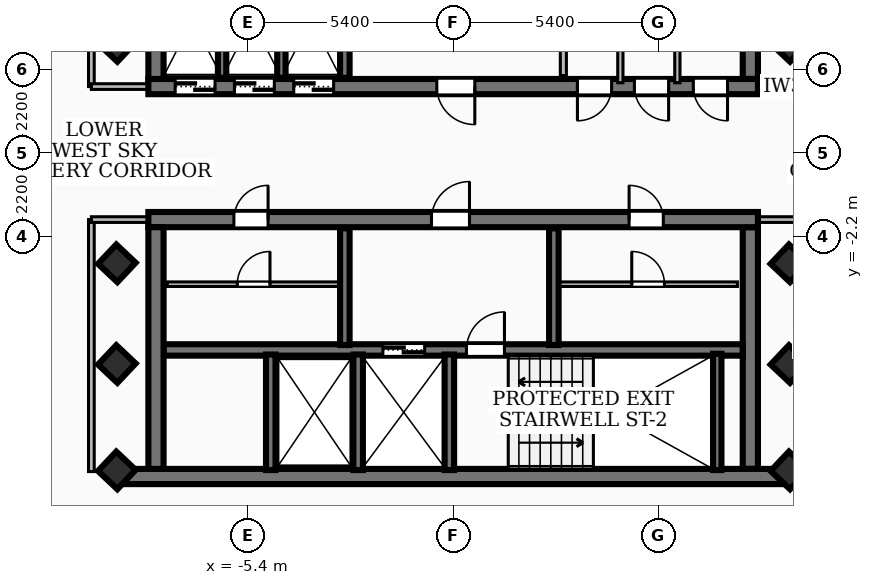
"""IFC4 building model, lengths in metres.
Left out: names, types, materials, properties, quantities, classifications, styles, units other than length and angle.
Written with IfcOpenShell. Run it as: python <this file> out.ifc"""

import sys

from ifc_helpers import new_model, si_unit, direction, frame, frame_2d, origin, origin_2d, place, context, subcontext, project, spatial, rectangle, extrude, element, fill, save


model = new_model("IFC4")
c1 = context("Model", 3, precision=1e-05, world=origin(), true_north=direction((0.0, 1.0)))
c2 = subcontext(c1, "Body", "Model", "MODEL_VIEW")
j1 = project(units=[si_unit("LENGTHUNIT", "METRE"), si_unit("PLANEANGLEUNIT", "RADIAN")], contexts=[c1])
p1 = place(None, origin())
s1 = spatial("IfcSite", under=j1, at=p1, CompositionType="ELEMENT")
p2 = place(p1, origin())
s2 = spatial("IfcBuilding", under=s1, at=p2, CompositionType="ELEMENT")
p3 = place(p2, frame((0.0, 0.0, 247.5)))
s3 = spatial("IfcBuildingStorey", under=s2, at=p3, CompositionType="ELEMENT", Elevation=247.5)
p4 = place(p3, frame((8.02, 1.75, 0.0), z_axis=(0.0, 0.0, 1.0), x_axis=(-1.0, 0.0, 0.0)))
e1 = element("IfcWall", 1, at=p4, inside=s3, PredefinedType="SHEAR", context=c2, shape_type="SweptSolid", body=[
    extrude(rectangle(XDim=16.04, YDim=0.4, at=frame_2d((8.02, 0.0))), origin(), (0.0, 0.0, 1.0), 3.16),
])
p5 = place(p4, frame((7.45, 0.0, 0.0)))
e2 = element("IfcOpeningElement", 2, at=p5, cuts=e1, PredefinedType="OPENING", context=c2, shape_type="SweptSolid", body=[
    extrude(rectangle(XDim=1.0, YDim=2.1, at=frame_2d((0.5, 1.05))), frame((0.0, 0.21, 0.0), z_axis=(0.0, -1.0, 0.0), x_axis=(1.0, 0.0, 0.0)), (0.0, 0.0, 1.0), 0.42),
])
p6 = place(p4, frame((14.285, 0.0, 0.0)))
e3 = element("IfcOpeningElement", 3, at=p6, cuts=e1, PredefinedType="OPENING", context=c2, shape_type="SweptSolid", body=[
    extrude(rectangle(XDim=1.05, YDim=2.15, at=frame_2d((0.525, 1.075))), frame((0.0, 0.21, 0.0), z_axis=(0.0, -1.0, 0.0), x_axis=(1.0, 0.0, 0.0)), (0.0, 0.0, 1.0), 0.42),
])
p7 = place(p4, frame((12.725, 0.0, 0.0)))
e4 = element("IfcOpeningElement", 4, at=p7, cuts=e1, PredefinedType="OPENING", context=c2, shape_type="SweptSolid", body=[
    extrude(rectangle(XDim=1.05, YDim=2.15, at=frame_2d((0.525, 1.075))), frame((0.0, 0.21, 0.0), z_axis=(0.0, -1.0, 0.0), x_axis=(1.0, 0.0, 0.0)), (0.0, 0.0, 1.0), 0.42),
])
p8 = place(p4, frame((11.165, 0.0, 0.0)))
e5 = element("IfcOpeningElement", 5, at=p8, cuts=e1, PredefinedType="OPENING", context=c2, shape_type="SweptSolid", body=[
    extrude(rectangle(XDim=1.05, YDim=2.15, at=frame_2d((0.525, 1.075))), frame((0.0, 0.21, 0.0), z_axis=(0.0, -1.0, 0.0), x_axis=(1.0, 0.0, 0.0)), (0.0, 0.0, 1.0), 0.42),
])
p9 = place(p4, frame((3.85, 0.0, 0.0)))
e6 = element("IfcOpeningElement", 6, at=p9, cuts=e1, PredefinedType="OPENING", context=c2, shape_type="SweptSolid", body=[
    extrude(rectangle(XDim=0.9, YDim=2.06, at=frame_2d((0.45, 1.03))), frame((0.0, 0.21, 0.0), z_axis=(0.0, -1.0, 0.0), x_axis=(1.0, 0.0, 0.0)), (0.0, 0.0, 1.0), 0.42),
])
p10 = place(p4, frame((2.35, 0.0, 0.0)))
e7 = element("IfcOpeningElement", 7, at=p10, cuts=e1, PredefinedType="OPENING", context=c2, shape_type="SweptSolid", body=[
    extrude(rectangle(XDim=0.9, YDim=2.06, at=frame_2d((0.45, 1.03))), frame((0.0, 0.21, 0.0), z_axis=(0.0, -1.0, 0.0), x_axis=(1.0, 0.0, 0.0)), (0.0, 0.0, 1.0), 0.42),
])
p11 = place(p4, frame((0.8, 0.0, 0.0)))
e8 = element("IfcOpeningElement", 8, at=p11, cuts=e1, PredefinedType="OPENING", context=c2, shape_type="SweptSolid", body=[
    extrude(rectangle(XDim=0.9, YDim=2.06, at=frame_2d((0.45, 1.03))), frame((0.0, 0.21, 0.0), z_axis=(0.0, -1.0, 0.0), x_axis=(1.0, 0.0, 0.0)), (0.0, 0.0, 1.0), 0.42),
])
for number, where, z_axis, x_axis in (
    (9, (-7.82, 1.95, 0.0), (0.0, 0.0, 1.0), (0.0, 1.0, 0.0)),
    (10, (7.82, 8.31, 0.0), (0.0, 0.0, 1.0), (0.0, -1.0, 0.0)),
):
    element("IfcWall", number, at=place(p3, frame(where, z_axis=z_axis, x_axis=x_axis)), inside=s3, PredefinedType="SHEAR", context=c2, shape_type="SweptSolid", body=[
        extrude(rectangle(XDim=6.36, YDim=0.4, at=frame_2d((3.18, 0.0))), origin(), (0.0, 0.0, 1.0), 3.16),
    ])
p12 = place(p3, frame((8.78, -8.51, 0.0), z_axis=(0.0, 0.0, 1.0), x_axis=(-1.0, 0.0, 0.0)))
e11 = element("IfcWall", 11, at=p12, inside=s3, PredefinedType="SHEAR", context=c2, shape_type="SweptSolid", body=[
    extrude(rectangle(XDim=17.56, YDim=0.4, at=frame_2d((8.78, 0.0))), origin(), (0.0, 0.0, 1.0), 3.16),
])
p13 = place(p3, frame((-8.02, -1.75, 0.0), z_axis=(0.0, 0.0, 1.0), x_axis=(1.0, 0.0, 0.0)))
e12 = element("IfcWall", 12, at=p13, inside=s3, PredefinedType="SHEAR", context=c2, shape_type="SweptSolid", body=[
    extrude(rectangle(XDim=16.04, YDim=0.4, at=frame_2d((8.02, 0.0))), origin(), (0.0, 0.0, 1.0), 3.16),
])
p14 = place(p13, frame((7.45, 0.0, 0.0)))
e13 = element("IfcOpeningElement", 13, at=p14, cuts=e12, PredefinedType="OPENING", context=c2, shape_type="SweptSolid", body=[
    extrude(rectangle(XDim=1.0, YDim=2.1, at=frame_2d((0.5, 1.05))), frame((0.0, 0.21, 0.0), z_axis=(0.0, -1.0, 0.0), x_axis=(1.0, 0.0, 0.0)), (0.0, 0.0, 1.0), 0.42),
])
p15 = place(p13, frame((12.65, 0.0, 0.0)))
e14 = element("IfcOpeningElement", 14, at=p15, cuts=e12, PredefinedType="OPENING", context=c2, shape_type="SweptSolid", body=[
    extrude(rectangle(XDim=0.9, YDim=2.06, at=frame_2d((0.45, 1.03))), frame((0.0, 0.21, 0.0), z_axis=(0.0, -1.0, 0.0), x_axis=(1.0, 0.0, 0.0)), (0.0, 0.0, 1.0), 0.42),
])
p16 = place(p13, frame((2.25, 0.0, 0.0)))
e15 = element("IfcOpeningElement", 15, at=p16, cuts=e12, PredefinedType="OPENING", context=c2, shape_type="SweptSolid", body=[
    extrude(rectangle(XDim=0.9, YDim=2.06, at=frame_2d((0.45, 1.03))), frame((0.0, 0.21, 0.0), z_axis=(0.0, -1.0, 0.0), x_axis=(1.0, 0.0, 0.0)), (0.0, 0.0, 1.0), 0.42),
])
for number, where, z_axis, x_axis in (
    (16, (-7.82, -8.31, 0.0), (0.0, 0.0, 1.0), (0.0, 1.0, 0.0)),
    (17, (7.82, -1.95, 0.0), (0.0, 0.0, 1.0), (0.0, -1.0, 0.0)),
):
    element("IfcWall", number, at=place(p3, frame(where, z_axis=z_axis, x_axis=x_axis)), inside=s3, PredefinedType="SHEAR", context=c2, shape_type="SweptSolid", body=[
        extrude(rectangle(XDim=6.36, YDim=0.4, at=frame_2d((3.18, 0.0))), origin(), (0.0, 0.0, 1.0), 3.16),
    ])
p17 = place(p3, frame((-7.62, -5.18, 0.0), z_axis=(0.0, 0.0, 1.0), x_axis=(1.0, 0.0, 0.0)))
e18 = element("IfcWall", 18, at=p17, inside=s3, PredefinedType="SOLIDWALL", context=c2, shape_type="SweptSolid", body=[
    extrude(rectangle(XDim=15.24, YDim=0.3, at=frame_2d((7.62, 0.0))), origin(), (0.0, 0.0, 1.0), 3.16),
])
p18 = place(p17, frame((5.77, 0.0, 0.0)))
e19 = element("IfcOpeningElement", 19, at=p18, cuts=e18, PredefinedType="OPENING", context=c2, shape_type="SweptSolid", body=[
    extrude(rectangle(XDim=1.1, YDim=2.15, at=frame_2d((0.55, 1.075))), frame((0.0, 0.16, 0.0), z_axis=(0.0, -1.0, 0.0), x_axis=(1.0, 0.0, 0.0)), (0.0, 0.0, 1.0), 0.32),
])
p19 = place(p17, frame((7.97, 0.0, 0.0)))
e20 = element("IfcOpeningElement", 20, at=p19, cuts=e18, PredefinedType="OPENING", context=c2, shape_type="SweptSolid", body=[
    extrude(rectangle(XDim=1.0, YDim=2.1, at=frame_2d((0.5, 1.05))), frame((0.0, 0.16, 0.0), z_axis=(0.0, -1.0, 0.0), x_axis=(1.0, 0.0, 0.0)), (0.0, 0.0, 1.0), 0.32),
])
p20 = place(p3, frame((6.95, -8.34, 0.0), z_axis=(0.0, 0.0, 1.0), x_axis=(0.0, 1.0, 0.0)))
e21 = element("IfcWall", 21, at=p20, inside=s3, PredefinedType="SOLIDWALL", context=c2, shape_type="SweptSolid", body=[
    extrude(rectangle(XDim=3.06, YDim=0.22, at=frame_2d((1.53, 0.0))), origin(), (0.0, 0.0, 1.0), 3.16),
])
p21 = place(p3, frame((-2.85, 1.98, 0.0), z_axis=(0.0, 0.0, 1.0), x_axis=(0.0, 1.0, 0.0)))
e22 = element("IfcWall", 22, at=p21, inside=s3, PredefinedType="SOLIDWALL", context=c2, shape_type="SweptSolid", body=[
    extrude(rectangle(XDim=3.07, YDim=0.25, at=frame_2d((1.535, 0.0))), origin(), (0.0, 0.0, 1.0), 3.16),
])
for number, where, z_axis, x_axis in (
    (23, (-0.1, -8.34, 0.0), (0.0, 0.0, 1.0), (0.0, 1.0, 0.0)),
    (24, (-2.5, -8.34, 0.0), (0.0, 0.0, 1.0), (0.0, 1.0, 0.0)),
    (25, (-4.8, -8.34, 0.0), (0.0, 0.0, 1.0), (0.0, 1.0, 0.0)),
):
    element("IfcWall", number, at=place(p3, frame(where, z_axis=z_axis, x_axis=x_axis)), inside=s3, PredefinedType="SOLIDWALL", context=c2, shape_type="SweptSolid", body=[
        extrude(rectangle(XDim=3.04, YDim=0.25, at=frame_2d((1.52, 0.0))), origin(), (0.0, 0.0, 1.0), 3.16),
    ])
for number, where, z_axis, x_axis in (
    (26, (-2.85, -5.05, 0.0), (0.0, 0.0, 1.0), (0.0, 1.0, 0.0)),
    (27, (2.65, -5.05, 0.0), (0.0, 0.0, 1.0), (0.0, 1.0, 0.0)),
):
    element("IfcWall", number, at=place(p3, frame(where, z_axis=z_axis, x_axis=x_axis)), inside=s3, PredefinedType="SOLIDWALL", context=c2, shape_type="SweptSolid", body=[
        extrude(rectangle(XDim=3.07, YDim=0.25, at=frame_2d((1.535, 0.0))), origin(), (0.0, 0.0, 1.0), 3.16),
    ])
for number, where, z_axis, x_axis in (
    (28, (-6.08, 1.98, 0.0), (0.0, 0.0, 1.0), (0.0, 1.0, 0.0)),
    (29, (-4.52, 1.98, 0.0), (0.0, 0.0, 1.0), (0.0, 1.0, 0.0)),
):
    element("IfcWall", number, at=place(p3, frame(where, z_axis=z_axis, x_axis=x_axis)), inside=s3, PredefinedType="SOLIDWALL", context=c2, shape_type="SweptSolid", body=[
        extrude(rectangle(XDim=3.07, YDim=0.22, at=frame_2d((1.535, 0.0))), origin(), (0.0, 0.0, 1.0), 3.16),
    ])
for number, where, z_axis, x_axis in (
    (30, (-8.85, -5.55, 0.0), (0.0, 0.0, 1.0), (0.686, 0.728, 0.0)),
    (31, (-8.85, -2.9, 0.0), (0.0, 0.0, 1.0), (0.686, 0.728, 0.0)),
    (32, (-8.85, 2.9, 0.0), (0.0, 0.0, 1.0), (0.686, 0.728, 0.0)),
    (33, (8.85, -5.55, 0.0), (0.0, 0.0, 1.0), (0.686, 0.728, 0.0)),
    (34, (8.85, -2.9, 0.0), (0.0, 0.0, 1.0), (0.686, 0.728, 0.0)),
    (35, (8.85, 2.9, 0.0), (0.0, 0.0, 1.0), (0.686, 0.728, 0.0)),
    (36, (8.85, -8.35, 0.0), (0.0, 0.0, 1.0), (0.686, 0.728, 0.0)),
    (37, (-8.85, -8.35, 0.0), (0.0, 0.0, 1.0), (0.686, 0.728, 0.0)),
):
    element("IfcColumn", number, at=place(p3, frame(where, z_axis=z_axis, x_axis=x_axis)), inside=s3, PredefinedType="COLUMN", context=c2, shape_type="SweptSolid", body=[
        extrude(rectangle(XDim=0.7, YDim=0.7, at=origin_2d()), origin(), (0.0, 0.0, 1.0), 3.42),
    ])
p22 = place(p3, frame((-0.484, -19.405, 0.0), z_axis=(0.0, 0.0, 1.0), x_axis=(-0.727540784645, 0.686064433328, 0.0)))
e38 = element("IfcWall", 38, at=p22, inside=s3, PredefinedType="SOLIDWALL", context=c2, shape_type="SweptSolid", body=[
    extrude(rectangle(XDim=25.923, YDim=0.2, at=frame_2d((12.961, 0.0))), origin(), (0.0, 0.0, 1.0), 3.16),
])
p23 = place(p22, frame((19.02, 0.0, 0.85)))
e39 = element("IfcOpeningElement", 39, at=p23, cuts=e38, PredefinedType="OPENING", context=c2, shape_type="SweptSolid", body=[
    extrude(rectangle(XDim=2.4, YDim=2.1, at=frame_2d((1.2, 1.05))), frame((0.0, 0.11, 0.0), z_axis=(0.0, -1.0, 0.0), x_axis=(1.0, 0.0, 0.0)), (0.0, 0.0, 1.0), 0.22),
])
p24 = place(p3, frame((2.9, 2.04, 0.0), z_axis=(0.0, 0.0, 1.0), x_axis=(0.0, 1.0, 0.0)))
e40 = element("IfcWall", 40, at=p24, inside=s3, PredefinedType="PARTITIONING", context=c2, shape_type="SweptSolid", body=[
    extrude(rectangle(XDim=2.94, YDim=0.16, at=frame_2d((1.47, 0.0))), origin(), (0.0, 0.0, 1.0), 2.39),
])
p25 = place(p24, frame((1.82, 0.0, 0.0)))
e41 = element("IfcOpeningElement", 41, at=p25, cuts=e40, PredefinedType="OPENING", context=c2, shape_type="SweptSolid", body=[
    extrude(rectangle(XDim=0.9, YDim=2.06, at=frame_2d((0.45, 1.03))), frame((0.0, 0.09, 0.0), z_axis=(0.0, -1.0, 0.0), x_axis=(1.0, 0.0, 0.0)), (0.0, 0.0, 1.0), 0.18),
])
p26 = place(p3, frame((2.8, -3.45, 0.0), z_axis=(0.0, 0.0, 1.0), x_axis=(1.0, 0.0, 0.0)))
e42 = element("IfcWall", 42, at=p26, inside=s3, PredefinedType="PARTITIONING", context=c2, shape_type="SweptSolid", body=[
    extrude(rectangle(XDim=4.68, YDim=0.12, at=frame_2d((2.34, 0.0))), origin(), (0.0, 0.0, 1.0), 3.16),
])
p27 = place(p26, frame((1.9, 0.0, 0.0)))
e43 = element("IfcOpeningElement", 43, at=p27, cuts=e42, PredefinedType="OPENING", context=c2, shape_type="SweptSolid", body=[
    extrude(rectangle(XDim=0.86, YDim=2.04, at=frame_2d((0.43, 1.02))), frame((0.0, 0.07, 0.0), z_axis=(0.0, -1.0, 0.0), x_axis=(1.0, 0.0, 0.0)), (0.0, 0.0, 1.0), 0.14),
])
p28 = place(p3, frame((-7.52, -3.45, 0.0), z_axis=(0.0, 0.0, 1.0), x_axis=(1.0, 0.0, 0.0)))
e44 = element("IfcWall", 44, at=p28, inside=s3, PredefinedType="PARTITIONING", context=c2, shape_type="SweptSolid", body=[
    extrude(rectangle(XDim=4.54, YDim=0.12, at=frame_2d((2.27, 0.0))), origin(), (0.0, 0.0, 1.0), 3.16),
])
p29 = place(p28, frame((1.84, 0.0, 0.0)))
e45 = element("IfcOpeningElement", 45, at=p29, cuts=e44, PredefinedType="OPENING", context=c2, shape_type="SweptSolid", body=[
    extrude(rectangle(XDim=0.86, YDim=2.04, at=frame_2d((0.43, 1.02))), frame((0.0, 0.07, 0.0), z_axis=(0.0, -1.0, 0.0), x_axis=(1.0, 0.0, 0.0)), (0.0, 0.0, 1.0), 0.14),
])
for number, where, z_axis, x_axis in (
    (46, (4.4, 1.85, 0.0), (0.0, 0.0, 1.0), (0.0, 1.0, 0.0)),
    (47, (5.9, 1.85, 0.0), (0.0, 0.0, 1.0), (0.0, 1.0, 0.0)),
):
    element("IfcWall", number, at=place(p3, frame(where, z_axis=z_axis, x_axis=x_axis)), inside=s3, PredefinedType="PARTITIONING", context=c2, shape_type="SweptSolid", body=[
        extrude(rectangle(XDim=1.89, YDim=0.138, at=frame_2d((0.945, 0.0))), origin(), (0.0, 0.0, 1.0), 2.39),
    ])
p30 = place(p3, frame((-9.52, 1.75, 0.0), z_axis=(0.0, 0.0, 1.0), x_axis=(0.0, 1.0, 0.0)))
e48 = element("IfcWall", 48, at=p30, inside=s3, PredefinedType="PARTITIONING", context=c2, shape_type="SweptSolid", body=[
    extrude(rectangle(XDim=6.63, YDim=0.15, at=frame_2d((3.315, 0.0))), origin(), (0.0, 0.0, 1.0), 2.53),
])
p31 = place(p3, frame((-7.85, 1.75, 0.0), z_axis=(0.0, 0.0, 1.0), x_axis=(-1.0, 0.0, 0.0)))
e49 = element("IfcWall", 49, at=p31, inside=s3, PredefinedType="PARTITIONING", context=c2, shape_type="SweptSolid", body=[
    extrude(rectangle(XDim=1.67, YDim=0.15, at=frame_2d((0.835, 0.0))), origin(), (0.0, 0.0, 1.0), 2.39),
])
p32 = place(p3, frame((-9.52, -8.38, 0.0), z_axis=(0.0, 0.0, 1.0), x_axis=(0.0, 1.0, 0.0)))
e50 = element("IfcWall", 50, at=p32, inside=s3, PredefinedType="PARTITIONING", context=c2, shape_type="SweptSolid", body=[
    extrude(rectangle(XDim=6.63, YDim=0.15, at=frame_2d((3.315, 0.0))), origin(), (0.0, 0.0, 1.0), 3.16),
])
for number, where, z_axis, x_axis in (
    (51, (-7.85, -1.75, 0.0), (0.0, 0.0, 1.0), (-1.0, 0.0, 0.0)),
    (52, (7.85, 1.75, 0.0), (0.0, 0.0, 1.0), (1.0, 0.0, 0.0)),
    (53, (7.85, -1.75, 0.0), (0.0, 0.0, 1.0), (1.0, 0.0, 0.0)),
):
    element("IfcWall", number, at=place(p3, frame(where, z_axis=z_axis, x_axis=x_axis)), inside=s3, PredefinedType="PARTITIONING", context=c2, shape_type="SweptSolid", body=[
        extrude(rectangle(XDim=1.67, YDim=0.15, at=frame_2d((0.835, 0.0))), origin(), (0.0, 0.0, 1.0), 2.39),
    ])
p33 = place(p3, frame((-17.271, 2.514, 0.0), z_axis=(0.0, 0.0, 1.0), x_axis=(0.686068145865, 0.727537283739, 0.0)))
e54 = element("IfcWall", 54, at=p33, inside=s3, PredefinedType="PARTITIONING", context=c2, shape_type="SweptSolid", body=[
    extrude(rectangle(XDim=20.04, YDim=0.1, at=frame_2d((10.02, 0.0))), origin(), (0.0, 0.0, 1.0), 2.53),
])
p34 = place(p33, frame((9.76, 0.0, 0.0)))
e55 = element("IfcOpeningElement", 55, at=p34, cuts=e54, PredefinedType="OPENING", context=c2, shape_type="SweptSolid", body=[
    extrude(rectangle(XDim=0.86, YDim=2.04, at=frame_2d((0.43, 1.02))), frame((0.0, 0.06, 0.0), z_axis=(0.0, -1.0, 0.0), x_axis=(1.0, 0.0, 0.0)), (0.0, 0.0, 1.0), 0.12),
])
p35 = place(p33, frame((8.32, 0.0, 0.0)))
e56 = element("IfcOpeningElement", 56, at=p35, cuts=e54, PredefinedType="OPENING", context=c2, shape_type="SweptSolid", body=[
    extrude(rectangle(XDim=0.86, YDim=2.04, at=frame_2d((0.43, 1.02))), frame((0.0, 0.06, 0.0), z_axis=(0.0, -1.0, 0.0), x_axis=(1.0, 0.0, 0.0)), (0.0, 0.0, 1.0), 0.12),
])
p36 = place(p3, frame((17.271, -2.514, 0.0), z_axis=(0.0, 0.0, 1.0), x_axis=(-0.686068145865, -0.727537283739, 0.0)))
e57 = element("IfcWall", 57, at=p36, inside=s3, PredefinedType="PARTITIONING", context=c2, shape_type="SweptSolid", body=[
    extrude(rectangle(XDim=20.04, YDim=0.1, at=frame_2d((10.02, 0.0))), origin(), (0.0, 0.0, 1.0), 2.53),
])
p37 = place(p36, frame((10.86, 0.0, 0.0)))
e58 = element("IfcOpeningElement", 58, at=p37, cuts=e57, PredefinedType="OPENING", context=c2, shape_type="SweptSolid", body=[
    extrude(rectangle(XDim=0.86, YDim=2.04, at=frame_2d((0.43, 1.02))), frame((0.0, 0.06, 0.0), z_axis=(0.0, -1.0, 0.0), x_axis=(1.0, 0.0, 0.0)), (0.0, 0.0, 1.0), 0.12),
])
p38 = place(p36, frame((9.42, 0.0, 0.0)))
e59 = element("IfcOpeningElement", 59, at=p38, cuts=e57, PredefinedType="OPENING", context=c2, shape_type="SweptSolid", body=[
    extrude(rectangle(XDim=0.86, YDim=2.04, at=frame_2d((0.43, 1.02))), frame((0.0, 0.06, 0.0), z_axis=(0.0, -1.0, 0.0), x_axis=(1.0, 0.0, 0.0)), (0.0, 0.0, 1.0), 0.12),
])
p39 = place(p5, origin())
e60 = element("IfcDoor", 60, at=p39, inside=s3, OperationType="SINGLE_SWING_LEFT", PredefinedType="DOOR", context=c2, shape_type="SweptSolid", body=[
    extrude(rectangle(XDim=1.0, YDim=2.1, at=frame_2d((0.5, 1.05))), frame((0.0, 0.025, 0.0), z_axis=(0.0, -1.0, 0.0), x_axis=(1.0, 0.0, 0.0)), (0.0, 0.0, 1.0), 0.05),
])
fill(e2, e60)
p40 = place(p14, origin())
e61 = element("IfcDoor", 61, at=p40, inside=s3, OperationType="SINGLE_SWING_RIGHT", PredefinedType="DOOR", context=c2, shape_type="SweptSolid", body=[
    extrude(rectangle(XDim=1.0, YDim=2.1, at=frame_2d((0.5, 1.05))), frame((0.0, 0.025, 0.0), z_axis=(0.0, -1.0, 0.0), x_axis=(1.0, 0.0, 0.0)), (0.0, 0.0, 1.0), 0.05),
])
fill(e13, e61)
p41 = place(p18, origin())
e62 = element("IfcDoor", 62, at=p41, inside=s3, OperationType="DOUBLE_DOOR_SLIDING", PredefinedType="DOOR", context=c2, shape_type="SweptSolid", body=[
    extrude(rectangle(XDim=1.1, YDim=2.15, at=frame_2d((0.55, 1.075))), frame((0.0, 0.025, 0.0), z_axis=(0.0, -1.0, 0.0), x_axis=(1.0, 0.0, 0.0)), (0.0, 0.0, 1.0), 0.05),
])
fill(e19, e62)
p42 = place(p19, origin())
e63 = element("IfcDoor", 63, at=p42, inside=s3, OperationType="SINGLE_SWING_RIGHT", PredefinedType="DOOR", context=c2, shape_type="SweptSolid", body=[
    extrude(rectangle(XDim=1.0, YDim=2.1, at=frame_2d((0.5, 1.05))), frame((0.0, 0.025, 0.0), z_axis=(0.0, -1.0, 0.0), x_axis=(1.0, 0.0, 0.0)), (0.0, 0.0, 1.0), 0.05),
])
fill(e20, e63)
p43 = place(p6, origin())
e64 = element("IfcDoor", 64, at=p43, inside=s3, OperationType="DOUBLE_DOOR_SLIDING", PredefinedType="DOOR", context=c2, shape_type="SweptSolid", body=[
    extrude(rectangle(XDim=1.05, YDim=2.15, at=frame_2d((0.525, 1.075))), frame((0.0, 0.025, 0.0), z_axis=(0.0, -1.0, 0.0), x_axis=(1.0, 0.0, 0.0)), (0.0, 0.0, 1.0), 0.05),
])
fill(e3, e64)
p44 = place(p7, origin())
e65 = element("IfcDoor", 65, at=p44, inside=s3, OperationType="DOUBLE_DOOR_SLIDING", PredefinedType="DOOR", context=c2, shape_type="SweptSolid", body=[
    extrude(rectangle(XDim=1.05, YDim=2.15, at=frame_2d((0.525, 1.075))), frame((0.0, 0.025, 0.0), z_axis=(0.0, -1.0, 0.0), x_axis=(1.0, 0.0, 0.0)), (0.0, 0.0, 1.0), 0.05),
])
fill(e4, e65)
p45 = place(p8, origin())
e66 = element("IfcDoor", 66, at=p45, inside=s3, OperationType="DOUBLE_DOOR_SLIDING", PredefinedType="DOOR", context=c2, shape_type="SweptSolid", body=[
    extrude(rectangle(XDim=1.05, YDim=2.15, at=frame_2d((0.525, 1.075))), frame((0.0, 0.025, 0.0), z_axis=(0.0, -1.0, 0.0), x_axis=(1.0, 0.0, 0.0)), (0.0, 0.0, 1.0), 0.05),
])
fill(e5, e66)
p46 = place(p15, origin())
e67 = element("IfcDoor", 67, at=p46, inside=s3, OperationType="SINGLE_SWING_LEFT", PredefinedType="DOOR", context=c2, shape_type="SweptSolid", body=[
    extrude(rectangle(XDim=0.9, YDim=2.06, at=frame_2d((0.45, 1.03))), frame((0.0, 0.025, 0.0), z_axis=(0.0, -1.0, 0.0), x_axis=(1.0, 0.0, 0.0)), (0.0, 0.0, 1.0), 0.05),
])
fill(e14, e67)
p47 = place(p16, origin())
e68 = element("IfcDoor", 68, at=p47, inside=s3, OperationType="SINGLE_SWING_RIGHT", PredefinedType="DOOR", context=c2, shape_type="SweptSolid", body=[
    extrude(rectangle(XDim=0.9, YDim=2.06, at=frame_2d((0.45, 1.03))), frame((0.0, 0.025, 0.0), z_axis=(0.0, -1.0, 0.0), x_axis=(1.0, 0.0, 0.0)), (0.0, 0.0, 1.0), 0.05),
])
fill(e15, e68)
p48 = place(p9, origin())
e69 = element("IfcDoor", 69, at=p48, inside=s3, OperationType="SINGLE_SWING_RIGHT", PredefinedType="DOOR", context=c2, shape_type="SweptSolid", body=[
    extrude(rectangle(XDim=0.9, YDim=2.06, at=frame_2d((0.45, 1.03))), frame((0.0, 0.025, 0.0), z_axis=(0.0, -1.0, 0.0), x_axis=(1.0, 0.0, 0.0)), (0.0, 0.0, 1.0), 0.05),
])
fill(e6, e69)
p49 = place(p10, origin())
e70 = element("IfcDoor", 70, at=p49, inside=s3, OperationType="SINGLE_SWING_LEFT", PredefinedType="DOOR", context=c2, shape_type="SweptSolid", body=[
    extrude(rectangle(XDim=0.9, YDim=2.06, at=frame_2d((0.45, 1.03))), frame((0.0, 0.025, 0.0), z_axis=(0.0, -1.0, 0.0), x_axis=(1.0, 0.0, 0.0)), (0.0, 0.0, 1.0), 0.05),
])
fill(e7, e70)
p50 = place(p11, origin())
e71 = element("IfcDoor", 71, at=p50, inside=s3, OperationType="SINGLE_SWING_LEFT", PredefinedType="DOOR", context=c2, shape_type="SweptSolid", body=[
    extrude(rectangle(XDim=0.9, YDim=2.06, at=frame_2d((0.45, 1.03))), frame((0.0, 0.025, 0.0), z_axis=(0.0, -1.0, 0.0), x_axis=(1.0, 0.0, 0.0)), (0.0, 0.0, 1.0), 0.05),
])
fill(e8, e71)
p51 = place(p27, origin())
e72 = element("IfcDoor", 72, at=p51, inside=s3, OperationType="SINGLE_SWING_LEFT", PredefinedType="DOOR", context=c2, shape_type="SweptSolid", body=[
    extrude(rectangle(XDim=0.86, YDim=2.04, at=frame_2d((0.43, 1.02))), frame((0.0, 0.025, 0.0), z_axis=(0.0, -1.0, 0.0), x_axis=(1.0, 0.0, 0.0)), (0.0, 0.0, 1.0), 0.05),
])
fill(e43, e72)
p52 = place(p29, origin())
e73 = element("IfcDoor", 73, at=p52, inside=s3, OperationType="SINGLE_SWING_RIGHT", PredefinedType="DOOR", context=c2, shape_type="SweptSolid", body=[
    extrude(rectangle(XDim=0.86, YDim=2.04, at=frame_2d((0.43, 1.02))), frame((0.0, 0.025, 0.0), z_axis=(0.0, -1.0, 0.0), x_axis=(1.0, 0.0, 0.0)), (0.0, 0.0, 1.0), 0.05),
])
fill(e45, e73)
save(model, sys.argv[1])
